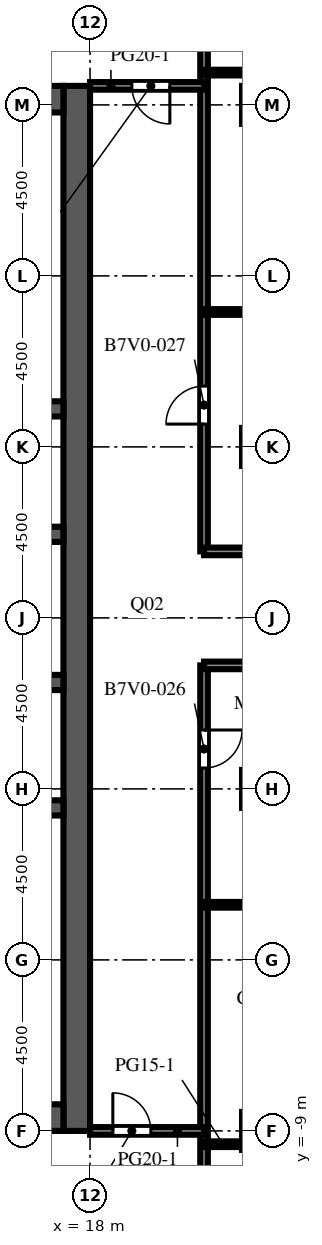
"""IFC4 building model, lengths in metres.
Left out: names, types, materials, properties, quantities, classifications, styles, units other than length and angle.
Written with IfcOpenShell. Run it as: python <this file> out.ifc"""

import sys

from ifc_helpers import new_model, si_unit, direction, frame, frame_2d, origin, place, context, subcontext, project, spatial, rectangle, extrude, element, fill, save


model = new_model("IFC4")
c1 = context("Model", 3, precision=1e-05, world=origin(), true_north=direction((0.0, 1.0)))
c2 = subcontext(c1, "Body", "Model", "MODEL_VIEW")
j1 = project(units=[si_unit("LENGTHUNIT", "METRE"), si_unit("PLANEANGLEUNIT", "RADIAN")], contexts=[c1])
p1 = place(None, origin())
s1 = spatial("IfcSite", under=j1, at=p1, CompositionType="ELEMENT")
p2 = place(p1, origin())
s2 = spatial("IfcBuilding", under=s1, at=p2, CompositionType="ELEMENT")
p3 = place(p2, frame((0.0, 0.0, 235.7)))
s3 = spatial("IfcBuildingStorey", under=s2, at=p3, CompositionType="ELEMENT", Elevation=235.7)
p4 = place(p3, frame((17.65, -9.0, 0.0), z_axis=(0.0, 0.0, 1.0), x_axis=(0.0, 1.0, 0.0)))
e1 = element("IfcWall", 1, at=p4, inside=s3, PredefinedType="SHEAR", context=c2, shape_type="SweptSolid", body=[
    extrude(rectangle(XDim=27.5, YDim=0.7, at=frame_2d((13.75, 0.0))), origin(), (0.0, 0.0, 1.0), 4.1),
])
p5 = place(p4, frame((12.55, 0.0, 0.0)))
e2 = element("IfcOpeningElement", 2, at=p5, cuts=e1, PredefinedType="OPENING", context=c2, shape_type="SweptSolid", body=[
    extrude(rectangle(XDim=2.4, YDim=2.4, at=frame_2d((1.2, 1.2))), frame((0.0, 0.36, 0.0), z_axis=(0.0, -1.0, 0.0), x_axis=(1.0, 0.0, 0.0)), (0.0, 0.0, 1.0), 0.72),
])
p6 = place(p4, frame((6.825, 0.0, 0.0)))
e3 = element("IfcOpeningElement", 3, at=p6, cuts=e1, PredefinedType="OPENING", context=c2, shape_type="SweptSolid", body=[
    extrude(rectangle(XDim=1.2, YDim=2.1, at=frame_2d((0.6, 1.05))), frame((0.0, 0.36, 0.0), z_axis=(0.0, -1.0, 0.0), x_axis=(1.0, 0.0, 0.0)), (0.0, 0.0, 1.0), 0.72),
])
p7 = place(p4, frame((19.475, 0.0, 0.0)))
e4 = element("IfcOpeningElement", 4, at=p7, cuts=e1, PredefinedType="OPENING", context=c2, shape_type="SweptSolid", body=[
    extrude(rectangle(XDim=1.2, YDim=2.1, at=frame_2d((0.6, 1.05))), frame((0.0, 0.36, 0.0), z_axis=(0.0, -1.0, 0.0), x_axis=(1.0, 0.0, 0.0)), (0.0, 0.0, 1.0), 0.72),
])
for number, where, z_axis, x_axis in (
    (5, (6.7, -8.65, 0.0), (0.0, 0.0, 1.0), (1.0, 0.0, 0.0)),
    (6, (6.7, 18.15, 0.0), (0.0, 0.0, 1.0), (1.0, 0.0, 0.0)),
):
    element("IfcWall", number, at=place(p3, frame(where, z_axis=z_axis, x_axis=x_axis)), inside=s3, PredefinedType="SHEAR", context=c2, shape_type="SweptSolid", body=[
        extrude(rectangle(XDim=10.6, YDim=0.7, at=frame_2d((5.3, 0.0))), origin(), (0.0, 0.0, 1.0), 4.1),
    ])
p8 = place(p3, frame((6.7, -0.5, 0.0), z_axis=(0.0, 0.0, 1.0), x_axis=(1.0, 0.0, 0.0)))
e7 = element("IfcWall", 7, at=p8, inside=s3, PredefinedType="SHEAR", context=c2, shape_type="SweptSolid", body=[
    extrude(rectangle(XDim=10.6, YDim=0.4, at=frame_2d((5.3, 0.0))), origin(), (0.0, 0.0, 1.0), 4.1),
])
p9 = place(p3, frame((6.7, 2.8, 0.0), z_axis=(0.0, 0.0, 1.0), x_axis=(1.0, 0.0, 0.0)))
e8 = element("IfcWall", 8, at=p9, inside=s3, PredefinedType="SHEAR", context=c2, shape_type="SweptSolid", body=[
    extrude(rectangle(XDim=10.6, YDim=0.4, at=frame_2d((5.3, 0.0))), origin(), (0.0, 0.0, 1.0), 4.1),
])
p10 = place(p9, frame((0.688, 0.0, 0.0)))
e9 = element("IfcOpeningElement", 9, at=p10, cuts=e8, PredefinedType="OPENING", context=c2, shape_type="SweptSolid", body=[
    extrude(rectangle(XDim=1.1, YDim=2.1, at=frame_2d((0.55, 1.05))), frame((0.0, 0.21, 0.0), z_axis=(0.0, -1.0, 0.0), x_axis=(1.0, 0.0, 0.0)), (0.0, 0.0, 1.0), 0.42),
])
p11 = place(p9, frame((3.438, 0.0, 0.0)))
e10 = element("IfcOpeningElement", 10, at=p11, cuts=e8, PredefinedType="OPENING", context=c2, shape_type="SweptSolid", body=[
    extrude(rectangle(XDim=1.1, YDim=2.1, at=frame_2d((0.55, 1.05))), frame((0.0, 0.21, 0.0), z_axis=(0.0, -1.0, 0.0), x_axis=(1.0, 0.0, 0.0)), (0.0, 0.0, 1.0), 0.42),
])
p12 = place(p9, frame((6.113, 0.0, 0.0)))
e11 = element("IfcOpeningElement", 11, at=p12, cuts=e8, PredefinedType="OPENING", context=c2, shape_type="SweptSolid", body=[
    extrude(rectangle(XDim=1.0, YDim=2.1, at=frame_2d((0.5, 1.05))), frame((0.0, 0.21, 0.0), z_axis=(0.0, -1.0, 0.0), x_axis=(1.0, 0.0, 0.0)), (0.0, 0.0, 1.0), 0.42),
])
p13 = place(p9, frame((8.863, 0.0, 0.0)))
e12 = element("IfcOpeningElement", 12, at=p13, cuts=e8, PredefinedType="OPENING", context=c2, shape_type="SweptSolid", body=[
    extrude(rectangle(XDim=1.0, YDim=2.1, at=frame_2d((0.5, 1.05))), frame((0.0, 0.21, 0.0), z_axis=(0.0, -1.0, 0.0), x_axis=(1.0, 0.0, 0.0)), (0.0, 0.0, 1.0), 0.42),
])
p14 = place(p3, frame((6.7, 6.7, 0.0), z_axis=(0.0, 0.0, 1.0), x_axis=(1.0, 0.0, 0.0)))
e13 = element("IfcWall", 13, at=p14, inside=s3, PredefinedType="SHEAR", context=c2, shape_type="SweptSolid", body=[
    extrude(rectangle(XDim=10.6, YDim=0.4, at=frame_2d((5.3, 0.0))), origin(), (0.0, 0.0, 1.0), 4.1),
])
p15 = place(p14, frame((3.438, 0.0, 0.0)))
e14 = element("IfcOpeningElement", 14, at=p15, cuts=e13, PredefinedType="OPENING", context=c2, shape_type="SweptSolid", body=[
    extrude(rectangle(XDim=1.1, YDim=2.1, at=frame_2d((0.55, 1.05))), frame((0.0, 0.21, 0.0), z_axis=(0.0, -1.0, 0.0), x_axis=(1.0, 0.0, 0.0)), (0.0, 0.0, 1.0), 0.42),
])
p16 = place(p14, frame((6.062, 0.0, 0.0)))
e15 = element("IfcOpeningElement", 15, at=p16, cuts=e13, PredefinedType="OPENING", context=c2, shape_type="SweptSolid", body=[
    extrude(rectangle(XDim=1.1, YDim=2.1, at=frame_2d((0.55, 1.05))), frame((0.0, 0.21, 0.0), z_axis=(0.0, -1.0, 0.0), x_axis=(1.0, 0.0, 0.0)), (0.0, 0.0, 1.0), 0.42),
])
p17 = place(p14, frame((8.812, 0.0, 0.0)))
e16 = element("IfcOpeningElement", 16, at=p17, cuts=e13, PredefinedType="OPENING", context=c2, shape_type="SweptSolid", body=[
    extrude(rectangle(XDim=1.1, YDim=2.1, at=frame_2d((0.55, 1.05))), frame((0.0, 0.21, 0.0), z_axis=(0.0, -1.0, 0.0), x_axis=(1.0, 0.0, 0.0)), (0.0, 0.0, 1.0), 0.42),
])
p18 = place(p14, frame((0.738, 0.0, 0.0)))
e17 = element("IfcOpeningElement", 17, at=p18, cuts=e13, PredefinedType="OPENING", context=c2, shape_type="SweptSolid", body=[
    extrude(rectangle(XDim=1.0, YDim=2.1, at=frame_2d((0.5, 1.05))), frame((0.0, 0.21, 0.0), z_axis=(0.0, -1.0, 0.0), x_axis=(1.0, 0.0, 0.0)), (0.0, 0.0, 1.0), 0.42),
])
p19 = place(p3, frame((6.7, 10.0, 0.0), z_axis=(0.0, 0.0, 1.0), x_axis=(1.0, 0.0, 0.0)))
e18 = element("IfcWall", 18, at=p19, inside=s3, PredefinedType="SHEAR", context=c2, shape_type="SweptSolid", body=[
    extrude(rectangle(XDim=10.6, YDim=0.4, at=frame_2d((5.3, 0.0))), origin(), (0.0, 0.0, 1.0), 4.1),
])
p20 = place(p3, frame((21.0, 3.25, 0.0), z_axis=(0.0, 0.0, 1.0), x_axis=(0.0, -1.0, 0.0)))
e19 = element("IfcWall", 19, at=p20, inside=s3, PredefinedType="PARTITIONING", context=c2, shape_type="SweptSolid", body=[
    extrude(rectangle(XDim=25.6, YDim=0.2, at=frame_2d((12.8, 0.0))), origin(), (0.0, 0.0, 1.0), 3.65),
])
p21 = place(p20, frame((1.7, 0.0, 0.0)))
e20 = element("IfcOpeningElement", 20, at=p21, cuts=e19, PredefinedType="OPENING", context=c2, shape_type="SweptSolid", body=[
    extrude(rectangle(XDim=1.0, YDim=2.1, at=frame_2d((0.5, 1.05))), frame((0.0, 0.11, 0.0), z_axis=(0.0, -1.0, 0.0), x_axis=(1.0, 0.0, 0.0)), (0.0, 0.0, 1.0), 0.22),
])
p22 = place(p3, frame((21.0, 31.35, 0.0), z_axis=(0.0, 0.0, 1.0), x_axis=(0.0, -1.0, 0.0)))
e21 = element("IfcWall", 21, at=p22, inside=s3, PredefinedType="PARTITIONING", context=c2, shape_type="SweptSolid", body=[
    extrude(rectangle(XDim=25.1, YDim=0.2, at=frame_2d((12.55, 0.0))), origin(), (0.0, 0.0, 1.0), 3.65),
])
p23 = place(p22, frame((20.75, 0.0, 0.0)))
e22 = element("IfcOpeningElement", 22, at=p23, cuts=e21, PredefinedType="OPENING", context=c2, shape_type="SweptSolid", body=[
    extrude(rectangle(XDim=1.0, YDim=2.1, at=frame_2d((0.5, 1.05))), frame((0.0, 0.11, 0.0), z_axis=(0.0, -1.0, 0.0), x_axis=(1.0, 0.0, 0.0)), (0.0, 0.0, 1.0), 0.22),
])
p24 = place(p3, frame((21.0, -9.35, 0.0), z_axis=(0.0, 0.0, 1.0), x_axis=(1.0, 0.0, 0.0)))
e23 = element("IfcWall", 23, at=p24, inside=s3, PredefinedType="PARTITIONING", context=c2, shape_type="SweptSolid", body=[
    extrude(rectangle(XDim=1.0, YDim=0.15, at=frame_2d((0.5, 0.0))), origin(), (0.0, 0.0, 1.0), 3.65),
])
p25 = place(p3, frame((21.0, -9.0, 0.0), z_axis=(0.0, 0.0, 1.0), x_axis=(-1.0, 0.0, 0.0)))
e24 = element("IfcWall", 24, at=p25, inside=s3, PredefinedType="PARTITIONING", context=c2, shape_type="SweptSolid", body=[
    extrude(rectangle(XDim=3.0, YDim=0.2, at=frame_2d((1.5, 0.0))), origin(), (0.0, 0.0, 1.0), 3.65),
])
p26 = place(p25, frame((1.4, 0.0, 0.0)))
e25 = element("IfcOpeningElement", 25, at=p26, cuts=e24, PredefinedType="OPENING", context=c2, shape_type="SweptSolid", body=[
    extrude(rectangle(XDim=1.0, YDim=2.1, at=frame_2d((0.5, 1.05))), frame((0.0, 0.11, 0.0), z_axis=(0.0, -1.0, 0.0), x_axis=(1.0, 0.0, 0.0)), (0.0, 0.0, 1.0), 0.22),
])
p27 = place(p3, frame((26.85, -3.05, 0.0), z_axis=(0.0, 0.0, 1.0), x_axis=(-1.0, 0.0, 0.0)))
e26 = element("IfcWall", 26, at=p27, inside=s3, PredefinedType="PARTITIONING", context=c2, shape_type="SweptSolid", body=[
    extrude(rectangle(XDim=5.85, YDim=0.15, at=frame_2d((2.925, 0.0))), origin(), (0.0, 0.0, 1.0), 3.65),
])
p28 = place(p27, frame((3.0, 0.0, 0.0)))
e27 = element("IfcOpeningElement", 27, at=p28, cuts=e26, PredefinedType="OPENING", context=c2, shape_type="SweptSolid", body=[
    extrude(rectangle(XDim=1.0, YDim=2.1, at=frame_2d((0.5, 1.05))), frame((0.0, 0.085, 0.0), z_axis=(0.0, -1.0, 0.0), x_axis=(1.0, 0.0, 0.0)), (0.0, 0.0, 1.0), 0.17),
])
for number, where, z_axis, x_axis in (
    (28, (21.0, 3.25, 0.0), (0.0, 0.0, 1.0), (1.0, 0.0, 0.0)),
    (29, (21.0, 6.25, 0.0), (0.0, 0.0, 1.0), (1.0, 0.0, 0.0)),
):
    element("IfcWall", number, at=place(p3, frame(where, z_axis=z_axis, x_axis=x_axis)), inside=s3, PredefinedType="PARTITIONING", context=c2, shape_type="SweptSolid", body=[
        extrude(rectangle(XDim=5.85, YDim=0.2, at=frame_2d((2.925, 0.0))), origin(), (0.0, 0.0, 1.0), 3.65),
    ])
p29 = place(p3, frame((21.0, 12.55, 0.0), z_axis=(0.0, 0.0, 1.0), x_axis=(1.0, 0.0, 0.0)))
e30 = element("IfcWall", 30, at=p29, inside=s3, PredefinedType="PARTITIONING", context=c2, shape_type="SweptSolid", body=[
    extrude(rectangle(XDim=5.85, YDim=0.15, at=frame_2d((2.925, 0.0))), origin(), (0.0, 0.0, 1.0), 3.65),
])
p30 = place(p29, frame((2.6, 0.0, 0.0)))
e31 = element("IfcOpeningElement", 31, at=p30, cuts=e30, PredefinedType="OPENING", context=c2, shape_type="SweptSolid", body=[
    extrude(rectangle(XDim=1.0, YDim=2.1, at=frame_2d((0.5, 1.05))), frame((0.0, 0.085, 0.0), z_axis=(0.0, -1.0, 0.0), x_axis=(1.0, 0.0, 0.0)), (0.0, 0.0, 1.0), 0.17),
])
p31 = place(p3, frame((18.0, 18.5, 0.0), z_axis=(0.0, 0.0, 1.0), x_axis=(1.0, 0.0, 0.0)))
e32 = element("IfcWall", 32, at=p31, inside=s3, PredefinedType="PARTITIONING", context=c2, shape_type="SweptSolid", body=[
    extrude(rectangle(XDim=3.0, YDim=0.2, at=frame_2d((1.5, 0.0))), origin(), (0.0, 0.0, 1.0), 3.65),
])
p32 = place(p31, frame((1.1, 0.0, 0.0)))
e33 = element("IfcOpeningElement", 33, at=p32, cuts=e32, PredefinedType="OPENING", context=c2, shape_type="SweptSolid", body=[
    extrude(rectangle(XDim=1.0, YDim=2.1, at=frame_2d((0.5, 1.05))), frame((0.0, 0.11, 0.0), z_axis=(0.0, -1.0, 0.0), x_axis=(1.0, 0.0, 0.0)), (0.0, 0.0, 1.0), 0.22),
])
p33 = place(p3, frame((21.0, 18.85, 0.0), z_axis=(0.0, 0.0, 1.0), x_axis=(1.0, 0.0, 0.0)))
e34 = element("IfcWall", 34, at=p33, inside=s3, PredefinedType="PARTITIONING", context=c2, shape_type="SweptSolid", body=[
    extrude(rectangle(XDim=5.85, YDim=0.15, at=frame_2d((2.925, 0.0))), origin(), (0.0, 0.0, 1.0), 3.65),
])
p34 = place(p33, frame((3.35, 0.0, 0.0)))
e35 = element("IfcOpeningElement", 35, at=p34, cuts=e34, PredefinedType="OPENING", context=c2, shape_type="SweptSolid", body=[
    extrude(rectangle(XDim=1.0, YDim=2.1, at=frame_2d((0.5, 1.05))), frame((0.0, 0.085, 0.0), z_axis=(0.0, -1.0, 0.0), x_axis=(1.0, 0.0, 0.0)), (0.0, 0.0, 1.0), 0.17),
])
p35 = place(p5, origin())
e36 = element("IfcDoor", 36, at=p35, inside=s3, OperationType="DOUBLE_DOOR_DOUBLE_SWING", PredefinedType="DOOR", context=c2, shape_type="SweptSolid", body=[
    extrude(rectangle(XDim=2.4, YDim=2.4, at=frame_2d((1.2, 1.2))), frame((0.0, 0.025, 0.0), z_axis=(0.0, -1.0, 0.0), x_axis=(1.0, 0.0, 0.0)), (0.0, 0.0, 1.0), 0.05),
])
fill(e2, e36)
p36 = place(p6, frame((1.2, 0.0, 0.0), z_axis=(0.0, 0.0, 1.0), x_axis=(-1.0, 0.0, 0.0)))
e37 = element("IfcDoor", 37, at=p36, inside=s3, OperationType="SINGLE_SWING_LEFT", PredefinedType="DOOR", context=c2, shape_type="SweptSolid", body=[
    extrude(rectangle(XDim=1.2, YDim=2.1, at=frame_2d((0.6, 1.05))), frame((0.0, 0.025, 0.0), z_axis=(0.0, -1.0, 0.0), x_axis=(1.0, 0.0, 0.0)), (0.0, 0.0, 1.0), 0.05),
])
fill(e3, e37)
p37 = place(p7, frame((1.2, 0.0, 0.0), z_axis=(0.0, 0.0, 1.0), x_axis=(-1.0, 0.0, 0.0)))
e38 = element("IfcDoor", 38, at=p37, inside=s3, OperationType="SINGLE_SWING_LEFT", PredefinedType="DOOR", context=c2, shape_type="SweptSolid", body=[
    extrude(rectangle(XDim=1.2, YDim=2.1, at=frame_2d((0.6, 1.05))), frame((0.0, 0.025, 0.0), z_axis=(0.0, -1.0, 0.0), x_axis=(1.0, 0.0, 0.0)), (0.0, 0.0, 1.0), 0.05),
])
fill(e4, e38)
p38 = place(p26, origin())
e39 = element("IfcDoor", 39, at=p38, inside=s3, OperationType="SINGLE_SWING_RIGHT", PredefinedType="DOOR", context=c2, shape_type="SweptSolid", body=[
    extrude(rectangle(XDim=1.0, YDim=2.1, at=frame_2d((0.5, 1.05))), frame((0.0, 0.025, 0.0), z_axis=(0.0, -1.0, 0.0), x_axis=(1.0, 0.0, 0.0)), (0.0, 0.0, 1.0), 0.05),
])
fill(e25, e39)
p39 = place(p32, origin())
e40 = element("IfcDoor", 40, at=p39, inside=s3, OperationType="SINGLE_SWING_RIGHT", PredefinedType="DOOR", context=c2, shape_type="SweptSolid", body=[
    extrude(rectangle(XDim=1.0, YDim=2.1, at=frame_2d((0.5, 1.05))), frame((0.0, 0.025, 0.0), z_axis=(0.0, -1.0, 0.0), x_axis=(1.0, 0.0, 0.0)), (0.0, 0.0, 1.0), 0.05),
])
fill(e33, e40)
p40 = place(p21, origin())
e41 = element("IfcDoor", 41, at=p40, inside=s3, OperationType="SINGLE_SWING_LEFT", PredefinedType="DOOR", context=c2, shape_type="SweptSolid", body=[
    extrude(rectangle(XDim=1.0, YDim=2.1, at=frame_2d((0.5, 1.05))), frame((0.0, 0.025, 0.0), z_axis=(0.0, -1.0, 0.0), x_axis=(1.0, 0.0, 0.0)), (0.0, 0.0, 1.0), 0.05),
])
fill(e20, e41)
p41 = place(p23, origin())
e42 = element("IfcDoor", 42, at=p41, inside=s3, OperationType="SINGLE_SWING_RIGHT", PredefinedType="DOOR", context=c2, shape_type="SweptSolid", body=[
    extrude(rectangle(XDim=1.0, YDim=2.1, at=frame_2d((0.5, 1.05))), frame((0.0, 0.025, 0.0), z_axis=(0.0, -1.0, 0.0), x_axis=(1.0, 0.0, 0.0)), (0.0, 0.0, 1.0), 0.05),
])
fill(e22, e42)
save(model, sys.argv[1])
